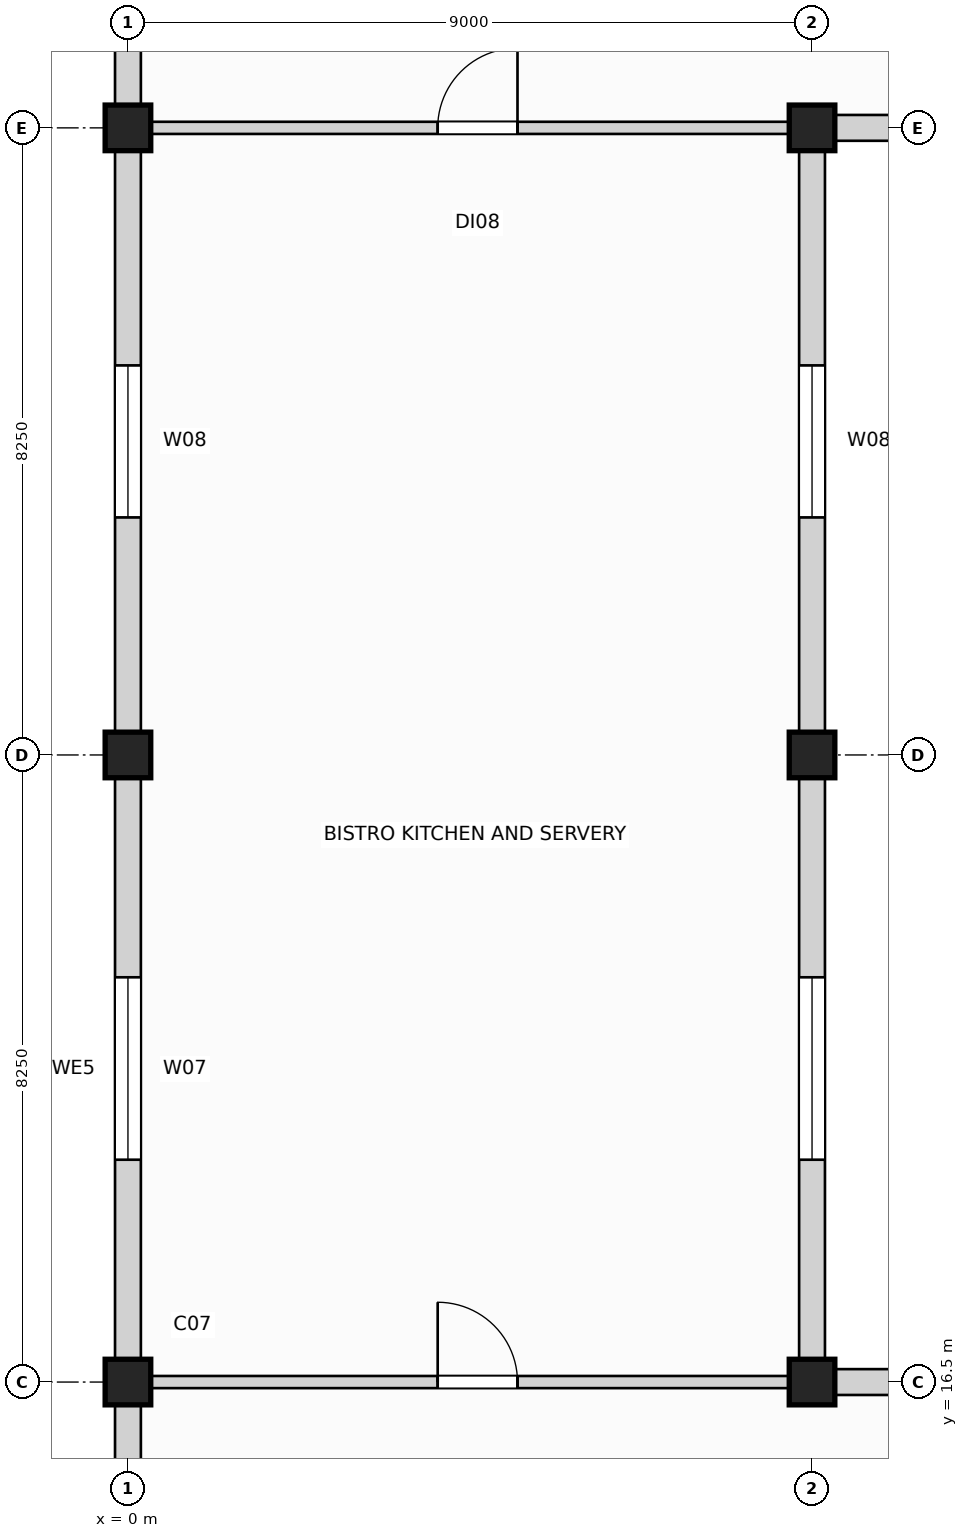
"""IFC4 building model, lengths in metres.
Left out: names, types, materials, properties, quantities, classifications, styles, units other than length and angle.
Written with IfcOpenShell. Run it as: python <this file> out.ifc"""

import sys

from ifc_helpers import new_model, si_unit, direction, frame, frame_2d, origin, origin_2d, place, context, subcontext, project, spatial, rectangle, extrude, element, fill, save


model = new_model("IFC4")
c1 = context("Model", 3, precision=1e-05, world=origin(), true_north=direction((0.0, 1.0)))
c2 = subcontext(c1, "Body", "Model", "MODEL_VIEW")
j1 = project(units=[si_unit("LENGTHUNIT", "METRE"), si_unit("PLANEANGLEUNIT", "RADIAN")], contexts=[c1])
p1 = place(None, origin())
s1 = spatial("IfcSite", under=j1, at=p1, CompositionType="ELEMENT")
p2 = place(p1, origin())
s2 = spatial("IfcBuilding", under=s1, at=p2, CompositionType="ELEMENT")
p3 = place(p2, origin())
s3 = spatial("IfcBuildingStorey", under=s2, at=p3, CompositionType="ELEMENT", Elevation=0.0)
for number, where, z_axis, x_axis in (
    (1, (0.0, 16.5, 0.0), (0.0, 0.0, 1.0), (1.0, 0.0, 0.0)),
    (2, (0.0, 24.75, 0.0), (0.0, 0.0, 1.0), (1.0, 0.0, 0.0)),
    (3, (0.0, 33.0, 0.0), (0.0, 0.0, 1.0), (1.0, 0.0, 0.0)),
    (4, (9.0, 16.5, 0.0), (0.0, 0.0, 1.0), (1.0, 0.0, 0.0)),
    (5, (9.0, 24.75, 0.0), (0.0, 0.0, 1.0), (1.0, 0.0, 0.0)),
    (6, (9.0, 33.0, 0.0), (0.0, 0.0, 1.0), (1.0, 0.0, 0.0)),
):
    element("IfcColumn", number, at=place(p3, frame(where, z_axis=z_axis, x_axis=x_axis)), inside=s3, PredefinedType="COLUMN", context=c2, shape_type="SweptSolid", body=[
        extrude(rectangle(XDim=0.6, YDim=0.6, at=origin_2d()), origin(), (0.0, 0.0, 1.0), 6.0),
    ])
p4 = place(p3, frame((0.0, 8.545, 0.0), z_axis=(0.0, 0.0, 1.0), x_axis=(0.0, 1.0, 0.0)))
e7 = element("IfcWall", 7, at=p4, inside=s3, PredefinedType="SOLIDWALL", context=c2, shape_type="SweptSolid", body=[
    extrude(rectangle(XDim=7.66, YDim=0.34, at=frame_2d((3.83, 0.0))), origin(), (0.0, 0.0, 1.0), 4.715),
])
p5 = place(p4, frame((2.83, 0.0, 0.0)))
e8 = element("IfcOpeningElement", 8, at=p5, cuts=e7, PredefinedType="OPENING", context=c2, shape_type="SweptSolid", body=[
    extrude(rectangle(XDim=2.0, YDim=2.4, at=frame_2d((1.0, 1.2))), frame((0.0, 0.18, 0.0), z_axis=(0.0, -1.0, 0.0), x_axis=(1.0, 0.0, 0.0)), (0.0, 0.0, 1.0), 0.36),
])
p6 = place(p3, frame((0.0, 16.795, 0.0), z_axis=(0.0, 0.0, 1.0), x_axis=(0.0, 1.0, 0.0)))
e9 = element("IfcWall", 9, at=p6, inside=s3, PredefinedType="SOLIDWALL", context=c2, shape_type="SweptSolid", body=[
    extrude(rectangle(XDim=7.66, YDim=0.34, at=frame_2d((3.83, 0.0))), origin(), (0.0, 0.0, 1.0), 4.715),
])
p7 = place(p6, frame((2.63, 0.0, 0.85)))
e10 = element("IfcOpeningElement", 10, at=p7, cuts=e9, PredefinedType="OPENING", context=c2, shape_type="SweptSolid", body=[
    extrude(rectangle(XDim=2.4, YDim=2.7, at=frame_2d((1.2, 1.35))), frame((0.0, 0.18, 0.0), z_axis=(0.0, -1.0, 0.0), x_axis=(1.0, 0.0, 0.0)), (0.0, 0.0, 1.0), 0.36),
])
p8 = place(p3, frame((0.0, 25.045, 0.0), z_axis=(0.0, 0.0, 1.0), x_axis=(0.0, 1.0, 0.0)))
e11 = element("IfcWall", 11, at=p8, inside=s3, PredefinedType="SOLIDWALL", context=c2, shape_type="SweptSolid", body=[
    extrude(rectangle(XDim=7.66, YDim=0.34, at=frame_2d((3.83, 0.0))), origin(), (0.0, 0.0, 1.0), 4.915),
])
p9 = place(p8, frame((2.83, 0.0, 0.85)))
e12 = element("IfcOpeningElement", 12, at=p9, cuts=e11, PredefinedType="OPENING", context=c2, shape_type="SweptSolid", body=[
    extrude(rectangle(XDim=2.0, YDim=2.4, at=frame_2d((1.0, 1.2))), frame((0.0, 0.18, 0.0), z_axis=(0.0, -1.0, 0.0), x_axis=(1.0, 0.0, 0.0)), (0.0, 0.0, 1.0), 0.36),
])
p10 = place(p3, frame((0.0, 33.295, 0.0), z_axis=(0.0, 0.0, 1.0), x_axis=(0.0, 1.0, 0.0)))
e13 = element("IfcWall", 13, at=p10, inside=s3, PredefinedType="SOLIDWALL", context=c2, shape_type="SweptSolid", body=[
    extrude(rectangle(XDim=8.41, YDim=0.34, at=frame_2d((4.205, 0.0))), origin(), (0.0, 0.0, 1.0), 5.015),
])
p11 = place(p10, frame((3.005, 0.0, 0.85)))
e14 = element("IfcOpeningElement", 14, at=p11, cuts=e13, PredefinedType="OPENING", context=c2, shape_type="SweptSolid", body=[
    extrude(rectangle(XDim=2.4, YDim=2.7, at=frame_2d((1.2, 1.35))), frame((0.0, 0.18, 0.0), z_axis=(0.0, -1.0, 0.0), x_axis=(1.0, 0.0, 0.0)), (0.0, 0.0, 1.0), 0.36),
])
p12 = place(p3, frame((9.295, 16.5, 0.0), z_axis=(0.0, 0.0, 1.0), x_axis=(1.0, 0.0, 0.0)))
e15 = element("IfcWall", 15, at=p12, inside=s3, PredefinedType="SOLIDWALL", context=c2, shape_type="SweptSolid", body=[
    extrude(rectangle(XDim=8.41, YDim=0.34, at=frame_2d((4.205, 0.0))), origin(), (0.0, 0.0, 1.0), 5.015),
])
p13 = place(p12, frame((3.005, 0.0, 0.85)))
e16 = element("IfcOpeningElement", 16, at=p13, cuts=e15, PredefinedType="OPENING", context=c2, shape_type="SweptSolid", body=[
    extrude(rectangle(XDim=2.4, YDim=2.7, at=frame_2d((1.2, 1.35))), frame((0.0, 0.18, 0.0), z_axis=(0.0, -1.0, 0.0), x_axis=(1.0, 0.0, 0.0)), (0.0, 0.0, 1.0), 0.36),
])
p14 = place(p3, frame((9.0, 16.795, 0.0), z_axis=(0.0, 0.0, 1.0), x_axis=(0.0, 1.0, 0.0)))
e17 = element("IfcWall", 17, at=p14, inside=s3, PredefinedType="SOLIDWALL", context=c2, shape_type="SweptSolid", body=[
    extrude(rectangle(XDim=7.66, YDim=0.34, at=frame_2d((3.83, 0.0))), origin(), (0.0, 0.0, 1.0), 5.015),
])
p15 = place(p14, frame((2.63, 0.0, 0.85)))
e18 = element("IfcOpeningElement", 18, at=p15, cuts=e17, PredefinedType="OPENING", context=c2, shape_type="SweptSolid", body=[
    extrude(rectangle(XDim=2.4, YDim=2.7, at=frame_2d((1.2, 1.35))), frame((0.0, 0.18, 0.0), z_axis=(0.0, -1.0, 0.0), x_axis=(1.0, 0.0, 0.0)), (0.0, 0.0, 1.0), 0.36),
])
p16 = place(p3, frame((9.0, 25.045, 0.0), z_axis=(0.0, 0.0, 1.0), x_axis=(0.0, 1.0, 0.0)))
e19 = element("IfcWall", 19, at=p16, inside=s3, PredefinedType="SOLIDWALL", context=c2, shape_type="SweptSolid", body=[
    extrude(rectangle(XDim=7.66, YDim=0.34, at=frame_2d((3.83, 0.0))), origin(), (0.0, 0.0, 1.0), 5.015),
])
p17 = place(p16, frame((2.83, 0.0, 0.85)))
e20 = element("IfcOpeningElement", 20, at=p17, cuts=e19, PredefinedType="OPENING", context=c2, shape_type="SweptSolid", body=[
    extrude(rectangle(XDim=2.0, YDim=2.4, at=frame_2d((1.0, 1.2))), frame((0.0, 0.18, 0.0), z_axis=(0.0, -1.0, 0.0), x_axis=(1.0, 0.0, 0.0)), (0.0, 0.0, 1.0), 0.36),
])
p18 = place(p3, frame((17.705, 33.0, 0.0), z_axis=(0.0, 0.0, 1.0), x_axis=(-1.0, 0.0, 0.0)))
e21 = element("IfcWall", 21, at=p18, inside=s3, PredefinedType="SOLIDWALL", context=c2, shape_type="SweptSolid", body=[
    extrude(rectangle(XDim=8.41, YDim=0.34, at=frame_2d((4.205, 0.0))), origin(), (0.0, 0.0, 1.0), 5.015),
])
p19 = place(p18, frame((3.005, 0.0, 0.85)))
e22 = element("IfcOpeningElement", 22, at=p19, cuts=e21, PredefinedType="OPENING", context=c2, shape_type="SweptSolid", body=[
    extrude(rectangle(XDim=2.4, YDim=2.7, at=frame_2d((1.2, 1.35))), frame((0.0, 0.18, 0.0), z_axis=(0.0, -1.0, 0.0), x_axis=(1.0, 0.0, 0.0)), (0.0, 0.0, 1.0), 0.36),
])
p20 = place(p3, frame((0.2, 16.5, 0.0), z_axis=(0.0, 0.0, 1.0), x_axis=(1.0, 0.0, 0.0)))
e23 = element("IfcWall", 23, at=p20, inside=s3, PredefinedType="PARTITIONING", context=c2, shape_type="SweptSolid", body=[
    extrude(rectangle(XDim=8.8, YDim=0.16, at=frame_2d((4.4, 0.0))), origin(), (0.0, 0.0, 1.0), 4.715),
])
p21 = place(p20, frame((3.875, 0.0, 0.0)))
e24 = element("IfcOpeningElement", 24, at=p21, cuts=e23, PredefinedType="OPENING", context=c2, shape_type="SweptSolid", body=[
    extrude(rectangle(XDim=1.05, YDim=2.12, at=frame_2d((0.525, 1.06))), frame((0.0, 0.09, 0.0), z_axis=(0.0, -1.0, 0.0), x_axis=(1.0, 0.0, 0.0)), (0.0, 0.0, 1.0), 0.18),
])
p22 = place(p3, frame((0.2, 33.0, 0.0), z_axis=(0.0, 0.0, 1.0), x_axis=(1.0, 0.0, 0.0)))
e25 = element("IfcWall", 25, at=p22, inside=s3, PredefinedType="PARTITIONING", context=c2, shape_type="SweptSolid", body=[
    extrude(rectangle(XDim=8.8, YDim=0.16, at=frame_2d((4.4, 0.0))), origin(), (0.0, 0.0, 1.0), 5.015),
])
p23 = place(p22, frame((3.875, 0.0, 0.0)))
e26 = element("IfcOpeningElement", 26, at=p23, cuts=e25, PredefinedType="OPENING", context=c2, shape_type="SweptSolid", body=[
    extrude(rectangle(XDim=1.05, YDim=2.12, at=frame_2d((0.525, 1.06))), frame((0.0, 0.09, 0.0), z_axis=(0.0, -1.0, 0.0), x_axis=(1.0, 0.0, 0.0)), (0.0, 0.0, 1.0), 0.18),
])
p24 = place(p7, origin())
e27 = element("IfcWindow", 27, at=p24, inside=s3, PartitioningType="SINGLE_PANEL", PredefinedType="WINDOW", context=c2, shape_type="SweptSolid", body=[
    extrude(rectangle(XDim=2.4, YDim=2.7, at=frame_2d((1.2, 1.35))), frame((0.0, 0.03, 0.0), z_axis=(0.0, -1.0, 0.0), x_axis=(1.0, 0.0, 0.0)), (0.0, 0.0, 1.0), 0.06),
])
fill(e10, e27)
p25 = place(p9, origin())
e28 = element("IfcWindow", 28, at=p25, inside=s3, PartitioningType="SINGLE_PANEL", PredefinedType="WINDOW", context=c2, shape_type="SweptSolid", body=[
    extrude(rectangle(XDim=2.0, YDim=2.4, at=frame_2d((1.0, 1.2))), frame((0.0, 0.03, 0.0), z_axis=(0.0, -1.0, 0.0), x_axis=(1.0, 0.0, 0.0)), (0.0, 0.0, 1.0), 0.06),
])
fill(e12, e28)
p26 = place(p15, origin())
e29 = element("IfcWindow", 29, at=p26, inside=s3, PartitioningType="SINGLE_PANEL", PredefinedType="WINDOW", context=c2, shape_type="SweptSolid", body=[
    extrude(rectangle(XDim=2.4, YDim=2.7, at=frame_2d((1.2, 1.35))), frame((0.0, 0.03, 0.0), z_axis=(0.0, -1.0, 0.0), x_axis=(1.0, 0.0, 0.0)), (0.0, 0.0, 1.0), 0.06),
])
fill(e18, e29)
p27 = place(p17, origin())
e30 = element("IfcWindow", 30, at=p27, inside=s3, PartitioningType="SINGLE_PANEL", PredefinedType="WINDOW", context=c2, shape_type="SweptSolid", body=[
    extrude(rectangle(XDim=2.0, YDim=2.4, at=frame_2d((1.0, 1.2))), frame((0.0, 0.03, 0.0), z_axis=(0.0, -1.0, 0.0), x_axis=(1.0, 0.0, 0.0)), (0.0, 0.0, 1.0), 0.06),
])
fill(e20, e30)
p28 = place(p21, origin())
e31 = element("IfcDoor", 31, at=p28, inside=s3, OperationType="SINGLE_SWING_LEFT", PredefinedType="DOOR", context=c2, shape_type="SweptSolid", body=[
    extrude(rectangle(XDim=1.05, YDim=2.12, at=frame_2d((0.525, 1.06))), frame((0.0, 0.025, 0.0), z_axis=(0.0, -1.0, 0.0), x_axis=(1.0, 0.0, 0.0)), (0.0, 0.0, 1.0), 0.05),
])
fill(e24, e31)
p29 = place(p23, origin())
e32 = element("IfcDoor", 32, at=p29, inside=s3, OperationType="SINGLE_SWING_RIGHT", PredefinedType="DOOR", context=c2, shape_type="SweptSolid", body=[
    extrude(rectangle(XDim=1.05, YDim=2.12, at=frame_2d((0.525, 1.06))), frame((0.0, 0.025, 0.0), z_axis=(0.0, -1.0, 0.0), x_axis=(1.0, 0.0, 0.0)), (0.0, 0.0, 1.0), 0.05),
])
fill(e26, e32)
save(model, sys.argv[1])
